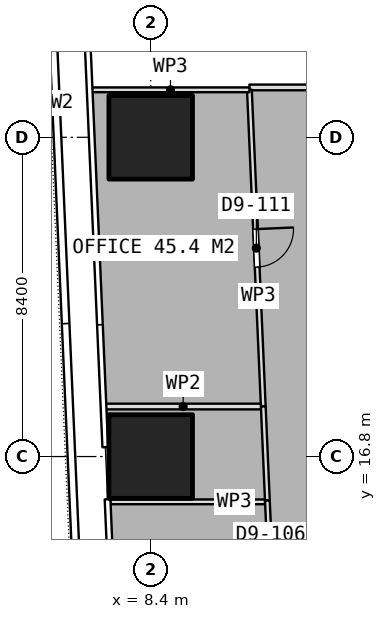
"""IFC4 building model, lengths in metres.
Left out: names, types, materials, properties, quantities, classifications, styles, units other than length and angle.
Written with IfcOpenShell. Run it as: python <this file> out.ifc"""

import sys

from ifc_helpers import new_model, si_unit, direction, frame, frame_2d, origin, origin_2d, place, context, subcontext, project, spatial, rectangle, extrude, element, fill, save


model = new_model("IFC4")
c1 = context("Model", 3, precision=1e-05, world=origin(), true_north=direction((0.0, 1.0)))
c2 = subcontext(c1, "Body", "Model", "MODEL_VIEW")
j1 = project(units=[si_unit("LENGTHUNIT", "METRE"), si_unit("PLANEANGLEUNIT", "RADIAN")], contexts=[c1])
p1 = place(None, origin())
s1 = spatial("IfcSite", under=j1, at=p1, CompositionType="ELEMENT")
p2 = place(p1, origin())
s2 = spatial("IfcBuilding", under=s1, at=p2, CompositionType="ELEMENT")
p3 = place(p2, frame((0.0, 0.0, 44.15)))
s3 = spatial("IfcBuildingStorey", under=s2, at=p3, CompositionType="ELEMENT", Elevation=44.15)
for number, where, z_axis, x_axis in (
    (1, (8.4, 16.8, 0.0), (0.0, 0.0, 1.0), (1.0, 0.0, 0.0)),
    (2, (8.4, 25.2, 0.0), (0.0, 0.0, 1.0), (1.0, 0.0, 0.0)),
):
    element("IfcColumn", number, at=place(p3, frame(where, z_axis=z_axis, x_axis=x_axis)), inside=s3, PredefinedType="COLUMN", context=c2, shape_type="SweptSolid", body=[
        extrude(rectangle(XDim=2.2, YDim=2.2, at=origin_2d()), origin(), (0.0, 0.0, 1.0), 3.75),
    ])
p4 = place(p3, frame((10.997, 26.449, 0.0), z_axis=(0.0, 0.0, 1.0), x_axis=(0.043768823127, -0.999041685878, 0.0)))
e3 = element("IfcWall", 3, at=p4, inside=s3, PredefinedType="PARTITIONING", context=c2, shape_type="SweptSolid", body=[
    extrude(rectangle(XDim=8.339, YDim=0.125, at=frame_2d((4.169, 0.0))), origin(), (0.0, 0.0, 1.0), 3.5),
])
p5 = place(p4, frame((3.669, 0.0, 0.0)))
e4 = element("IfcOpeningElement", 4, at=p5, cuts=e3, PredefinedType="OPENING", context=c2, shape_type="SweptSolid", body=[
    extrude(rectangle(XDim=1.0, YDim=2.1, at=frame_2d((0.5, 1.05))), frame((0.0, 0.073, 0.0), z_axis=(0.0, -1.0, 0.0), x_axis=(1.0, 0.0, 0.0)), (0.0, 0.0, 1.0), 0.145),
])
p6 = place(p3, frame((11.362, 18.118, 0.0), z_axis=(0.0, 0.0, 1.0), x_axis=(0.043578417469, -0.999050009525, 0.0)))
e5 = element("IfcWall", 5, at=p6, inside=s3, PredefinedType="PARTITIONING", context=c2, shape_type="SweptSolid", body=[
    extrude(rectangle(XDim=2.476, YDim=0.125, at=frame_2d((1.238, 0.0))), origin(), (0.0, 0.0, 1.0), 3.5),
])
p7 = place(p3, frame((11.409, 15.608, 0.0), z_axis=(0.0, 0.0, 1.0), x_axis=(-1.0, 0.0, 0.0)))
e6 = element("IfcWall", 6, at=p7, inside=s3, PredefinedType="PARTITIONING", context=c2, shape_type="SweptSolid", body=[
    extrude(rectangle(XDim=4.062, YDim=0.125, at=frame_2d((2.031, 0.0))), origin(), (0.0, 0.0, 1.0), 3.5),
])
p8 = place(p3, frame((6.843, 26.449, 0.0), z_axis=(0.0, 0.0, 1.0), x_axis=(1.0, 0.0, 0.0)))
e7 = element("IfcWall", 7, at=p8, inside=s3, PredefinedType="PARTITIONING", context=c2, shape_type="SweptSolid", body=[
    extrude(rectangle(XDim=4.154, YDim=0.125, at=frame_2d((2.077, 0.0))), origin(), (0.0, 0.0, 1.0), 3.5),
])
p9 = place(p3, frame((11.47, 15.643, 0.0), z_axis=(0.0, 0.0, 1.0), x_axis=(0.043689667834, -0.999045150594, 0.0)))
e8 = element("IfcWall", 8, at=p9, inside=s3, PredefinedType="PARTITIONING", context=c2, shape_type="SweptSolid", body=[
    extrude(rectangle(XDim=4.029, YDim=0.125, at=frame_2d((2.015, 0.0))), origin(), (0.0, 0.0, 1.0), 3.5),
])
p10 = place(p9, frame((1.514, 0.0, 0.0)))
e9 = element("IfcOpeningElement", 9, at=p10, cuts=e8, PredefinedType="OPENING", context=c2, shape_type="SweptSolid", body=[
    extrude(rectangle(XDim=1.0, YDim=2.1, at=frame_2d((0.5, 1.05))), frame((0.0, 0.073, 0.0), z_axis=(0.0, -1.0, 0.0), x_axis=(1.0, 0.0, 0.0)), (0.0, 0.0, 1.0), 0.145),
])
p11 = place(p3, frame((11.3, 18.116, 0.0), z_axis=(0.0, 0.0, 1.0), x_axis=(-1.0, 0.0, 0.0)))
e10 = element("IfcWall", 10, at=p11, inside=s3, PredefinedType="PARTITIONING", context=c2, shape_type="SweptSolid", body=[
    extrude(rectangle(XDim=4.092, YDim=0.15, at=frame_2d((2.046, 0.0))), origin(), (0.0, 0.0, 1.0), 3.5),
])
p12 = place(p3, frame((10.997, 26.512, 0.0), z_axis=(0.0, 0.0, 1.0), x_axis=(1.0, 0.0, 0.0)))
e11 = element("IfcWall", 11, at=p12, inside=s3, PredefinedType="PARTITIONING", context=c2, shape_type="SweptSolid", body=[
    extrude(rectangle(XDim=11.403, YDim=0.15, at=frame_2d((5.701, 0.0))), origin(), (0.0, 0.0, 1.0), 3.5),
])
p13 = place(p5, origin())
e12 = element("IfcDoor", 12, at=p13, inside=s3, OperationType="SINGLE_SWING_LEFT", PredefinedType="DOOR", context=c2, shape_type="SweptSolid", body=[
    extrude(rectangle(XDim=1.0, YDim=2.1, at=frame_2d((0.5, 1.05))), frame((0.0, 0.025, 0.0), z_axis=(0.0, -1.0, 0.0), x_axis=(1.0, 0.0, 0.0)), (0.0, 0.0, 1.0), 0.05),
])
fill(e4, e12)
save(model, sys.argv[1])
